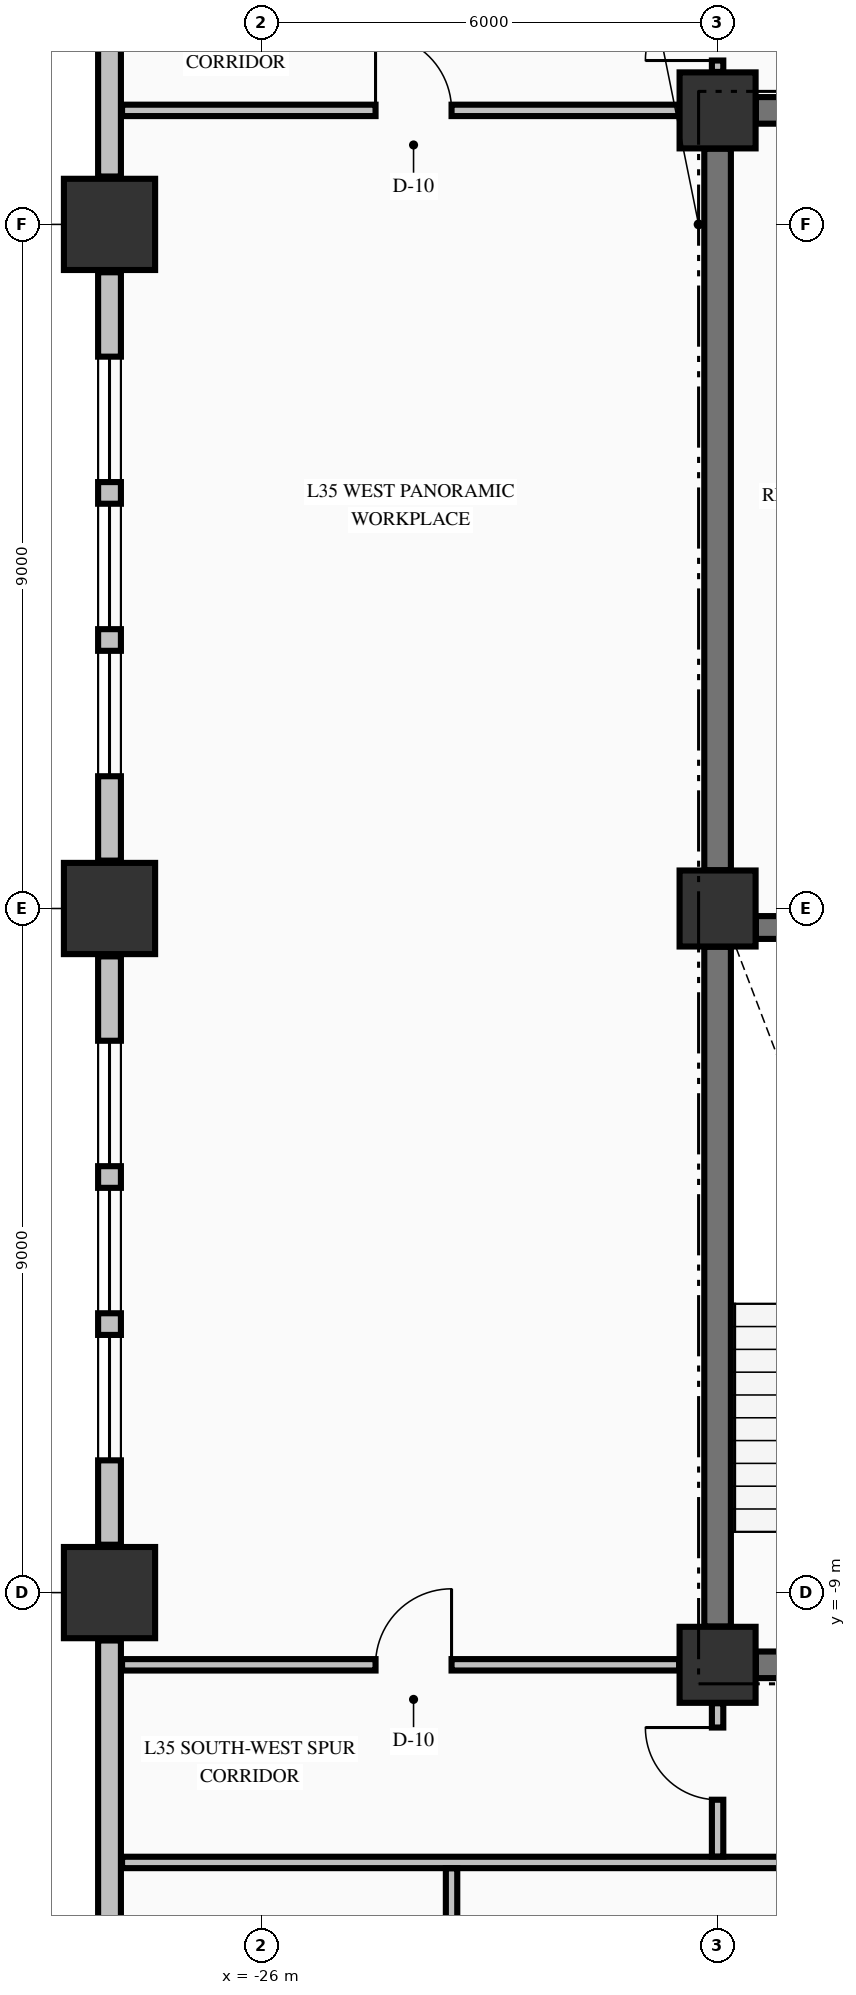
"""IFC4 building model, lengths in metres.
Left out: names, types, materials, properties, quantities, classifications, styles, units other than length and angle.
Written with IfcOpenShell. Run it as: python <this file> out.ifc"""

import sys

from ifc_helpers import new_model, si_unit, direction, frame, frame_2d, origin, origin_2d, place, context, subcontext, project, spatial, rectangle, extrude, element, fill, save


model = new_model("IFC4")
c1 = context("Model", 3, precision=1e-05, world=origin(), true_north=direction((0.0, 1.0)))
c2 = subcontext(c1, "Body", "Model", "MODEL_VIEW")
j1 = project(units=[si_unit("LENGTHUNIT", "METRE"), si_unit("PLANEANGLEUNIT", "RADIAN")], contexts=[c1])
p1 = place(None, origin())
s1 = spatial("IfcSite", under=j1, at=p1, CompositionType="ELEMENT")
p2 = place(p1, origin())
s2 = spatial("IfcBuilding", under=s1, at=p2, CompositionType="ELEMENT")
p3 = place(p2, frame((0.0, 0.0, 139.2)))
s3 = spatial("IfcBuildingStorey", under=s2, at=p3, CompositionType="ELEMENT", Elevation=139.2)
for number, where, z_axis, x_axis in (
    (1, (-28.0, -9.0, -0.25), (0.0, 0.0, 1.0), (1.0, 0.0, 0.0)),
    (2, (-28.0, 0.0, -0.25), (0.0, 0.0, 1.0), (1.0, 0.0, 0.0)),
    (3, (-28.0, 9.0, -0.25), (0.0, 0.0, 1.0), (1.0, 0.0, 0.0)),
):
    element("IfcColumn", number, at=place(p3, frame(where, z_axis=z_axis, x_axis=x_axis)), inside=s3, PredefinedType="COLUMN", context=c2, shape_type="SweptSolid", body=[
        extrude(rectangle(XDim=1.2, YDim=1.2, at=origin_2d()), origin(), (0.0, 0.0, 1.0), 3.495),
    ])
for number, where, z_axis, x_axis in (
    (4, (-20.0, -9.95, -0.25), (0.0, 0.0, 1.0), (1.0, 0.0, 0.0)),
    (5, (-20.0, 10.5, -0.25), (0.0, 0.0, 1.0), (1.0, 0.0, 0.0)),
    (6, (-20.0, 0.0, -0.25), (0.0, 0.0, 1.0), (1.0, 0.0, 0.0)),
):
    element("IfcColumn", number, at=place(p3, frame(where, z_axis=z_axis, x_axis=x_axis)), inside=s3, PredefinedType="COLUMN", context=c2, shape_type="SweptSolid", body=[
        extrude(rectangle(XDim=1.0, YDim=1.0, at=origin_2d()), origin(), (0.0, 0.0, 1.0), 3.495),
    ])
p4 = place(p3, frame((-28.0, -9.63, 0.0), z_axis=(0.0, 0.0, 1.0), x_axis=(0.0, -1.0, 0.0)))
e7 = element("IfcWall", 7, at=p4, inside=s3, PredefinedType="STANDARD", context=c2, shape_type="SweptSolid", body=[
    extrude(rectangle(XDim=10.74, YDim=0.3, at=frame_2d((5.37, 0.0))), origin(), (0.0, 0.0, 1.0), 2.637),
])
p5 = place(p3, frame((-28.0, -0.63, 0.0), z_axis=(0.0, 0.0, 1.0), x_axis=(0.0, -1.0, 0.0)))
e8 = element("IfcWall", 8, at=p5, inside=s3, PredefinedType="STANDARD", context=c2, shape_type="SweptSolid", body=[
    extrude(rectangle(XDim=7.74, YDim=0.3, at=frame_2d((3.87, 0.0))), origin(), (0.0, 0.0, 1.0), 2.637),
])
p6 = place(p5, frame((1.11, 0.0, 0.8)))
e9 = element("IfcOpeningElement", 9, at=p6, cuts=e8, PredefinedType="OPENING", context=c2, shape_type="SweptSolid", body=[
    extrude(rectangle(XDim=1.65, YDim=1.7, at=frame_2d((0.825, 0.85))), frame((0.0, 0.16, 0.0), z_axis=(0.0, -1.0, 0.0), x_axis=(1.0, 0.0, 0.0)), (0.0, 0.0, 1.0), 0.32),
])
p7 = place(p5, frame((3.045, 0.0, 0.8)))
e10 = element("IfcOpeningElement", 10, at=p7, cuts=e8, PredefinedType="OPENING", context=c2, shape_type="SweptSolid", body=[
    extrude(rectangle(XDim=1.65, YDim=1.7, at=frame_2d((0.825, 0.85))), frame((0.0, 0.16, 0.0), z_axis=(0.0, -1.0, 0.0), x_axis=(1.0, 0.0, 0.0)), (0.0, 0.0, 1.0), 0.32),
])
p8 = place(p5, frame((4.98, 0.0, 0.8)))
e11 = element("IfcOpeningElement", 11, at=p8, cuts=e8, PredefinedType="OPENING", context=c2, shape_type="SweptSolid", body=[
    extrude(rectangle(XDim=1.65, YDim=1.7, at=frame_2d((0.825, 0.85))), frame((0.0, 0.16, 0.0), z_axis=(0.0, -1.0, 0.0), x_axis=(1.0, 0.0, 0.0)), (0.0, 0.0, 1.0), 0.32),
])
p9 = place(p3, frame((-28.0, 8.37, 0.0), z_axis=(0.0, 0.0, 1.0), x_axis=(0.0, -1.0, 0.0)))
e12 = element("IfcWall", 12, at=p9, inside=s3, PredefinedType="STANDARD", context=c2, shape_type="SweptSolid", body=[
    extrude(rectangle(XDim=7.74, YDim=0.3, at=frame_2d((3.87, 0.0))), origin(), (0.0, 0.0, 1.0), 2.637),
])
p10 = place(p9, frame((1.11, 0.0, 0.8)))
e13 = element("IfcOpeningElement", 13, at=p10, cuts=e12, PredefinedType="OPENING", context=c2, shape_type="SweptSolid", body=[
    extrude(rectangle(XDim=1.65, YDim=1.7, at=frame_2d((0.825, 0.85))), frame((0.0, 0.16, 0.0), z_axis=(0.0, -1.0, 0.0), x_axis=(1.0, 0.0, 0.0)), (0.0, 0.0, 1.0), 0.32),
])
p11 = place(p9, frame((3.045, 0.0, 0.8)))
e14 = element("IfcOpeningElement", 14, at=p11, cuts=e12, PredefinedType="OPENING", context=c2, shape_type="SweptSolid", body=[
    extrude(rectangle(XDim=1.65, YDim=1.7, at=frame_2d((0.825, 0.85))), frame((0.0, 0.16, 0.0), z_axis=(0.0, -1.0, 0.0), x_axis=(1.0, 0.0, 0.0)), (0.0, 0.0, 1.0), 0.32),
])
p12 = place(p9, frame((4.98, 0.0, 0.8)))
e15 = element("IfcOpeningElement", 15, at=p12, cuts=e12, PredefinedType="OPENING", context=c2, shape_type="SweptSolid", body=[
    extrude(rectangle(XDim=1.65, YDim=1.7, at=frame_2d((0.825, 0.85))), frame((0.0, 0.16, 0.0), z_axis=(0.0, -1.0, 0.0), x_axis=(1.0, 0.0, 0.0)), (0.0, 0.0, 1.0), 0.32),
])
p13 = place(p3, frame((-28.0, 20.37, 0.0), z_axis=(0.0, 0.0, 1.0), x_axis=(0.0, -1.0, 0.0)))
e16 = element("IfcWall", 16, at=p13, inside=s3, PredefinedType="STANDARD", context=c2, shape_type="SweptSolid", body=[
    extrude(rectangle(XDim=10.74, YDim=0.3, at=frame_2d((5.37, 0.0))), origin(), (0.0, 0.0, 1.0), 2.637),
])
p14 = place(p3, frame((-19.496, -9.95, 0.0), z_axis=(0.0, 0.0, 1.0), x_axis=(1.0, 0.0, 0.0)))
e17 = element("IfcWall", 17, at=p14, inside=s3, PredefinedType="SHEAR", context=c2, shape_type="SweptSolid", body=[
    extrude(rectangle(XDim=4.796, YDim=0.35, at=frame_2d((2.398, 0.0))), origin(), (0.0, 0.0, 1.0), 3.245),
])
p15 = place(p14, frame((0.671, 0.0, 0.0)))
e18 = element("IfcOpeningElement", 18, at=p15, cuts=e17, PredefinedType="OPENING", context=c2, shape_type="SweptSolid", body=[
    extrude(rectangle(XDim=1.05, YDim=2.15, at=frame_2d((0.525, 1.075))), frame((0.0, 0.185, 0.0), z_axis=(0.0, -1.0, 0.0), x_axis=(1.0, 0.0, 0.0)), (0.0, 0.0, 1.0), 0.37),
])
p16 = place(p3, frame((-19.496, -0.25, 0.0), z_axis=(0.0, 0.0, 1.0), x_axis=(1.0, 0.0, 0.0)))
e19 = element("IfcWall", 19, at=p16, inside=s3, PredefinedType="SHEAR", context=c2, shape_type="SweptSolid", body=[
    extrude(rectangle(XDim=7.992, YDim=0.3, at=frame_2d((3.996, 0.0))), origin(), (0.0, 0.0, 1.0), 3.245),
])
p17 = place(p16, frame((5.796, 0.0, 0.0)))
e20 = element("IfcOpeningElement", 20, at=p17, cuts=e19, PredefinedType="OPENING", context=c2, shape_type="SweptSolid", body=[
    extrude(rectangle(XDim=1.1, YDim=2.15, at=frame_2d((0.55, 1.075))), frame((0.0, 0.16, 0.0), z_axis=(0.0, -1.0, 0.0), x_axis=(1.0, 0.0, 0.0)), (0.0, 0.0, 1.0), 0.32),
])
p18 = place(p3, frame((-19.496, 10.5, 0.0), z_axis=(0.0, 0.0, 1.0), x_axis=(1.0, 0.0, 0.0)))
e21 = element("IfcWall", 21, at=p18, inside=s3, PredefinedType="SHEAR", context=c2, shape_type="SweptSolid", body=[
    extrude(rectangle(XDim=4.796, YDim=0.35, at=frame_2d((2.398, 0.0))), origin(), (0.0, 0.0, 1.0), 3.245),
])
p19 = place(p18, frame((0.496, 0.0, 0.0)))
e22 = element("IfcOpeningElement", 22, at=p19, cuts=e21, PredefinedType="OPENING", context=c2, shape_type="SweptSolid", body=[
    extrude(rectangle(XDim=0.9, YDim=2.15, at=frame_2d((0.45, 1.075))), frame((0.0, 0.185, 0.0), z_axis=(0.0, -1.0, 0.0), x_axis=(1.0, 0.0, 0.0)), (0.0, 0.0, 1.0), 0.37),
])
p20 = place(p18, frame((3.046, 0.0, 0.0)))
e23 = element("IfcOpeningElement", 23, at=p20, cuts=e21, PredefinedType="OPENING", context=c2, shape_type="SweptSolid", body=[
    extrude(rectangle(XDim=0.9, YDim=2.15, at=frame_2d((0.45, 1.075))), frame((0.0, 0.185, 0.0), z_axis=(0.0, -1.0, 0.0), x_axis=(1.0, 0.0, 0.0)), (0.0, 0.0, 1.0), 0.37),
])
p21 = place(p3, frame((-27.835, -12.55, 0.0), z_axis=(0.0, 0.0, 1.0), x_axis=(1.0, 0.0, 0.0)))
e24 = element("IfcWall", 24, at=p21, inside=s3, PredefinedType="PARTITIONING", context=c2, shape_type="SweptSolid", body=[
    extrude(rectangle(XDim=50.67, YDim=0.15, at=frame_2d((25.335, 0.0))), origin(), (0.0, 0.0, 1.0), 3.245),
])
p22 = place(p21, frame((13.63, 0.0, 0.0)))
e25 = element("IfcOpeningElement", 25, at=p22, cuts=e24, PredefinedType="OPENING", context=c2, shape_type="SweptSolid", body=[
    extrude(rectangle(XDim=1.05, YDim=2.15, at=frame_2d((0.525, 1.075))), frame((0.0, 0.085, 0.0), z_axis=(0.0, -1.0, 0.0), x_axis=(1.0, 0.0, 0.0)), (0.0, 0.0, 1.0), 0.17),
])
p23 = place(p21, frame((31.11, 0.0, 0.0)))
e26 = element("IfcOpeningElement", 26, at=p23, cuts=e24, PredefinedType="OPENING", context=c2, shape_type="SweptSolid", body=[
    extrude(rectangle(XDim=1.05, YDim=2.15, at=frame_2d((0.525, 1.075))), frame((0.0, 0.085, 0.0), z_axis=(0.0, -1.0, 0.0), x_axis=(1.0, 0.0, 0.0)), (0.0, 0.0, 1.0), 0.17),
])
p24 = place(p21, frame((34.41, 0.0, 0.0)))
e27 = element("IfcOpeningElement", 27, at=p24, cuts=e24, PredefinedType="OPENING", context=c2, shape_type="SweptSolid", body=[
    extrude(rectangle(XDim=1.05, YDim=2.15, at=frame_2d((0.525, 1.075))), frame((0.0, 0.085, 0.0), z_axis=(0.0, -1.0, 0.0), x_axis=(1.0, 0.0, 0.0)), (0.0, 0.0, 1.0), 0.17),
])
p25 = place(p3, frame((-27.835, -9.95, 0.0), z_axis=(0.0, 0.0, 1.0), x_axis=(1.0, 0.0, 0.0)))
e28 = element("IfcWall", 28, at=p25, inside=s3, PredefinedType="PARTITIONING", context=c2, shape_type="SweptSolid", body=[
    extrude(rectangle(XDim=7.329, YDim=0.15, at=frame_2d((3.665, 0.0))), origin(), (0.0, 0.0, 1.0), 3.245),
])
p26 = place(p25, frame((3.335, 0.0, 0.0)))
e29 = element("IfcOpeningElement", 29, at=p26, cuts=e28, PredefinedType="OPENING", context=c2, shape_type="SweptSolid", body=[
    extrude(rectangle(XDim=1.0, YDim=2.15, at=frame_2d((0.5, 1.075))), frame((0.0, 0.085, 0.0), z_axis=(0.0, -1.0, 0.0), x_axis=(1.0, 0.0, 0.0)), (0.0, 0.0, 1.0), 0.17),
])
p27 = place(p3, frame((-27.835, 10.5, 0.0), z_axis=(0.0, 0.0, 1.0), x_axis=(1.0, 0.0, 0.0)))
e30 = element("IfcWall", 30, at=p27, inside=s3, PredefinedType="PARTITIONING", context=c2, shape_type="SweptSolid", body=[
    extrude(rectangle(XDim=7.329, YDim=0.15, at=frame_2d((3.665, 0.0))), origin(), (0.0, 0.0, 1.0), 3.245),
])
p28 = place(p27, frame((3.335, 0.0, 0.0)))
e31 = element("IfcOpeningElement", 31, at=p28, cuts=e30, PredefinedType="OPENING", context=c2, shape_type="SweptSolid", body=[
    extrude(rectangle(XDim=1.0, YDim=2.15, at=frame_2d((0.5, 1.075))), frame((0.0, 0.085, 0.0), z_axis=(0.0, -1.0, 0.0), x_axis=(1.0, 0.0, 0.0)), (0.0, 0.0, 1.0), 0.17),
])
p29 = place(p3, frame((-20.0, -9.446, 0.0), z_axis=(0.0, 0.0, 1.0), x_axis=(0.0, 1.0, 0.0)))
e32 = element("IfcWall", 32, at=p29, inside=s3, PredefinedType="SHEAR", context=c2, shape_type="SweptSolid", body=[
    extrude(rectangle(XDim=8.942, YDim=0.35, at=frame_2d((4.471, 0.0))), origin(), (0.0, 0.0, 1.0), 3.245),
])
p30 = place(p3, frame((-20.0, 0.504, 0.0), z_axis=(0.0, 0.0, 1.0), x_axis=(0.0, 1.0, 0.0)))
e33 = element("IfcWall", 33, at=p30, inside=s3, PredefinedType="SHEAR", context=c2, shape_type="SweptSolid", body=[
    extrude(rectangle(XDim=9.492, YDim=0.35, at=frame_2d((4.746, 0.0))), origin(), (0.0, 0.0, 1.0), 3.245),
])
p31 = place(p3, frame((-23.5, -20.394, 0.0), z_axis=(0.0, 0.0, 1.0), x_axis=(0.0, 1.0, 0.0)))
e34 = element("IfcWall", 34, at=p31, inside=s3, PredefinedType="PARTITIONING", context=c2, shape_type="SweptSolid", body=[
    extrude(rectangle(XDim=7.766, YDim=0.15, at=frame_2d((3.883, 0.0))), origin(), (0.0, 0.0, 1.0), 3.245),
])
p32 = place(p3, frame((-20.0, -12.472, 0.0), z_axis=(0.0, 0.0, 1.0), x_axis=(0.0, 1.0, 0.0)))
e35 = element("IfcWall", 35, at=p32, inside=s3, PredefinedType="PARTITIONING", context=c2, shape_type="SweptSolid", body=[
    extrude(rectangle(XDim=2.016, YDim=0.15, at=frame_2d((1.008, 0.0))), origin(), (0.0, 0.0, 1.0), 2.735),
])
p33 = place(p32, frame((0.747, 0.0, 0.0)))
e36 = element("IfcOpeningElement", 36, at=p33, cuts=e35, PredefinedType="OPENING", context=c2, shape_type="SweptSolid", body=[
    extrude(rectangle(XDim=0.95, YDim=2.15, at=frame_2d((0.475, 1.075))), frame((0.0, 0.085, 0.0), z_axis=(0.0, -1.0, 0.0), x_axis=(1.0, 0.0, 0.0)), (0.0, 0.0, 1.0), 0.17),
])
p34 = place(p3, frame((-20.0, 11.006, 0.0), z_axis=(0.0, 0.0, 1.0), x_axis=(0.0, 1.0, 0.0)))
e37 = element("IfcWall", 37, at=p34, inside=s3, PredefinedType="PARTITIONING", context=c2, shape_type="SweptSolid", body=[
    extrude(rectangle(XDim=1.666, YDim=0.15, at=frame_2d((0.833, 0.0))), origin(), (0.0, 0.0, 1.0), 2.735),
])
p35 = place(p34, frame((0.15, 0.0, 0.0)))
e38 = element("IfcOpeningElement", 38, at=p35, cuts=e37, PredefinedType="OPENING", context=c2, shape_type="SweptSolid", body=[
    extrude(rectangle(XDim=0.95, YDim=2.15, at=frame_2d((0.475, 1.075))), frame((0.0, 0.085, 0.0), z_axis=(0.0, -1.0, 0.0), x_axis=(1.0, 0.0, 0.0)), (0.0, 0.0, 1.0), 0.17),
])
p36 = place(p6, origin())
e39 = element("IfcWindow", 39, at=p36, inside=s3, PartitioningType="SINGLE_PANEL", PredefinedType="WINDOW", context=c2, shape_type="SweptSolid", body=[
    extrude(rectangle(XDim=1.65, YDim=1.7, at=frame_2d((0.825, 0.85))), frame((0.0, 0.03, 0.0), z_axis=(0.0, -1.0, 0.0), x_axis=(1.0, 0.0, 0.0)), (0.0, 0.0, 1.0), 0.06),
])
fill(e9, e39)
p37 = place(p7, origin())
e40 = element("IfcWindow", 40, at=p37, inside=s3, PartitioningType="SINGLE_PANEL", PredefinedType="WINDOW", context=c2, shape_type="SweptSolid", body=[
    extrude(rectangle(XDim=1.65, YDim=1.7, at=frame_2d((0.825, 0.85))), frame((0.0, 0.03, 0.0), z_axis=(0.0, -1.0, 0.0), x_axis=(1.0, 0.0, 0.0)), (0.0, 0.0, 1.0), 0.06),
])
fill(e10, e40)
p38 = place(p8, origin())
e41 = element("IfcWindow", 41, at=p38, inside=s3, PartitioningType="SINGLE_PANEL", PredefinedType="WINDOW", context=c2, shape_type="SweptSolid", body=[
    extrude(rectangle(XDim=1.65, YDim=1.7, at=frame_2d((0.825, 0.85))), frame((0.0, 0.03, 0.0), z_axis=(0.0, -1.0, 0.0), x_axis=(1.0, 0.0, 0.0)), (0.0, 0.0, 1.0), 0.06),
])
fill(e11, e41)
p39 = place(p10, origin())
e42 = element("IfcWindow", 42, at=p39, inside=s3, PartitioningType="SINGLE_PANEL", PredefinedType="WINDOW", context=c2, shape_type="SweptSolid", body=[
    extrude(rectangle(XDim=1.65, YDim=1.7, at=frame_2d((0.825, 0.85))), frame((0.0, 0.03, 0.0), z_axis=(0.0, -1.0, 0.0), x_axis=(1.0, 0.0, 0.0)), (0.0, 0.0, 1.0), 0.06),
])
fill(e13, e42)
p40 = place(p11, origin())
e43 = element("IfcWindow", 43, at=p40, inside=s3, PartitioningType="SINGLE_PANEL", PredefinedType="WINDOW", context=c2, shape_type="SweptSolid", body=[
    extrude(rectangle(XDim=1.65, YDim=1.7, at=frame_2d((0.825, 0.85))), frame((0.0, 0.03, 0.0), z_axis=(0.0, -1.0, 0.0), x_axis=(1.0, 0.0, 0.0)), (0.0, 0.0, 1.0), 0.06),
])
fill(e14, e43)
p41 = place(p12, origin())
e44 = element("IfcWindow", 44, at=p41, inside=s3, PartitioningType="SINGLE_PANEL", PredefinedType="WINDOW", context=c2, shape_type="SweptSolid", body=[
    extrude(rectangle(XDim=1.65, YDim=1.7, at=frame_2d((0.825, 0.85))), frame((0.0, 0.03, 0.0), z_axis=(0.0, -1.0, 0.0), x_axis=(1.0, 0.0, 0.0)), (0.0, 0.0, 1.0), 0.06),
])
fill(e15, e44)
p42 = place(p35, origin())
e45 = element("IfcDoor", 45, at=p42, inside=s3, OperationType="SINGLE_SWING_LEFT", PredefinedType="DOOR", context=c2, shape_type="SweptSolid", body=[
    extrude(rectangle(XDim=0.95, YDim=2.15, at=frame_2d((0.475, 1.075))), frame((0.0, 0.025, 0.0), z_axis=(0.0, -1.0, 0.0), x_axis=(1.0, 0.0, 0.0)), (0.0, 0.0, 1.0), 0.05),
])
fill(e38, e45)
p43 = place(p33, origin())
e46 = element("IfcDoor", 46, at=p43, inside=s3, OperationType="SINGLE_SWING_RIGHT", PredefinedType="DOOR", context=c2, shape_type="SweptSolid", body=[
    extrude(rectangle(XDim=0.95, YDim=2.15, at=frame_2d((0.475, 1.075))), frame((0.0, 0.025, 0.0), z_axis=(0.0, -1.0, 0.0), x_axis=(1.0, 0.0, 0.0)), (0.0, 0.0, 1.0), 0.05),
])
fill(e36, e46)
p44 = place(p28, origin())
e47 = element("IfcDoor", 47, at=p44, inside=s3, OperationType="SINGLE_SWING_LEFT", PredefinedType="DOOR", context=c2, shape_type="SweptSolid", body=[
    extrude(rectangle(XDim=1.0, YDim=2.15, at=frame_2d((0.5, 1.075))), frame((0.0, 0.025, 0.0), z_axis=(0.0, -1.0, 0.0), x_axis=(1.0, 0.0, 0.0)), (0.0, 0.0, 1.0), 0.05),
])
fill(e31, e47)
p45 = place(p26, origin())
e48 = element("IfcDoor", 48, at=p45, inside=s3, OperationType="SINGLE_SWING_RIGHT", PredefinedType="DOOR", context=c2, shape_type="SweptSolid", body=[
    extrude(rectangle(XDim=1.0, YDim=2.15, at=frame_2d((0.5, 1.075))), frame((0.0, 0.025, 0.0), z_axis=(0.0, -1.0, 0.0), x_axis=(1.0, 0.0, 0.0)), (0.0, 0.0, 1.0), 0.05),
])
fill(e29, e48)
save(model, sys.argv[1])
